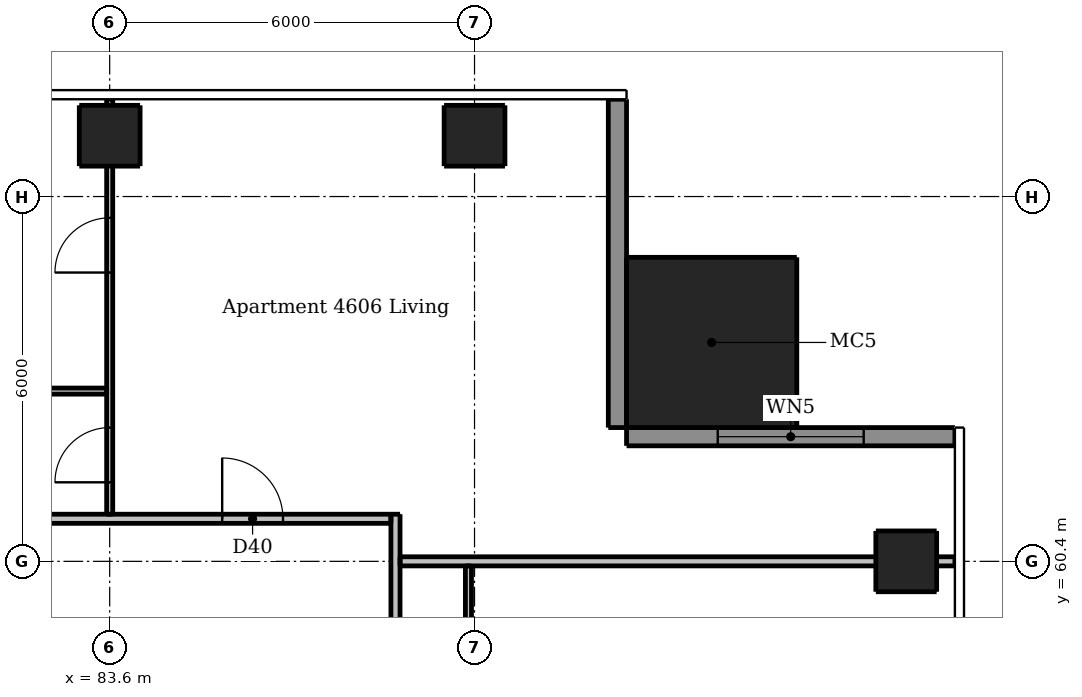
"""IFC4 building model, lengths in metres.
Left out: names, types, materials, properties, quantities, classifications, styles, units other than length and angle.
Written with IfcOpenShell. Run it as: python <this file> out.ifc"""

import sys

from ifc_helpers import new_model, si_unit, direction, frame, frame_2d, origin, origin_2d, place, context, subcontext, project, spatial, rectangle, extrude, element, fill, save


model = new_model("IFC4")
c1 = context("Model", 3, precision=1e-05, world=origin(), true_north=direction((0.0, 1.0)))
c2 = subcontext(c1, "Body", "Model", "MODEL_VIEW")
j1 = project(units=[si_unit("LENGTHUNIT", "METRE"), si_unit("PLANEANGLEUNIT", "RADIAN")], contexts=[c1])
p1 = place(None, origin())
s1 = spatial("IfcSite", under=j1, at=p1, CompositionType="ELEMENT")
p2 = place(p1, origin())
s2 = spatial("IfcBuilding", under=s1, at=p2, CompositionType="ELEMENT")
p3 = place(p2, frame((0.0, 0.0, 171.4)))
s3 = spatial("IfcBuildingStorey", under=s2, at=p3, CompositionType="ELEMENT", Elevation=171.4)
for number, where, z_axis, x_axis in (
    (1, (96.7, 60.4, 0.0), (0.0, 0.0, 1.0), (1.0, 0.0, 0.0)),
    (2, (83.6, 67.4, 0.0), (0.0, 0.0, 1.0), (1.0, 0.0, 0.0)),
    (3, (89.6, 67.4, 0.0), (0.0, 0.0, 1.0), (1.0, 0.0, 0.0)),
):
    element("IfcColumn", number, at=place(p3, frame(where, z_axis=z_axis, x_axis=x_axis)), inside=s3, PredefinedType="COLUMN", context=c2, shape_type="SweptSolid", body=[
        extrude(rectangle(XDim=1.0, YDim=1.0, at=origin_2d()), origin(), (0.0, 0.0, 1.0), 3.05),
    ])
p4 = place(p3, frame((93.5, 64.0, 0.0), z_axis=(0.0, 0.0, 1.0), x_axis=(1.0, 0.0, 0.0)))
e4 = element("IfcColumn", 4, at=p4, inside=s3, PredefinedType="COLUMN", context=c2, shape_type="SweptSolid", body=[
    extrude(rectangle(XDim=2.8, YDim=2.8, at=origin_2d()), origin(), (0.0, 0.0, 1.0), 3.3),
])
p5 = place(p3, frame((97.5, 62.45, 0.0), z_axis=(0.0, 0.0, 1.0), x_axis=(-1.0, 0.0, 0.0)))
e5 = element("IfcWall", 5, at=p5, inside=s3, PredefinedType="SOLIDWALL", context=c2, shape_type="SweptSolid", body=[
    extrude(rectangle(XDim=5.4, YDim=0.3, at=frame_2d((2.7, 0.0))), origin(), (0.0, 0.0, 1.0), 3.05),
])
p6 = place(p5, frame((1.5, 0.0, 0.15)))
e6 = element("IfcOpeningElement", 6, at=p6, cuts=e5, PredefinedType="OPENING", context=c2, shape_type="SweptSolid", body=[
    extrude(rectangle(XDim=2.4, YDim=2.1, at=frame_2d((1.2, 1.05))), frame((0.0, 0.16, 0.0), z_axis=(0.0, -1.0, 0.0), x_axis=(1.0, 0.0, 0.0)), (0.0, 0.0, 1.0), 0.32),
])
p7 = place(p3, frame((91.95, 62.6, 0.0), z_axis=(0.0, 0.0, 1.0), x_axis=(0.0, 1.0, 0.0)))
e7 = element("IfcWall", 7, at=p7, inside=s3, PredefinedType="SOLIDWALL", context=c2, shape_type="SweptSolid", body=[
    extrude(rectangle(XDim=5.4, YDim=0.3, at=frame_2d((2.7, 0.0))), origin(), (0.0, 0.0, 1.0), 3.05),
])
p8 = place(p3, frame((83.6, 61.175, 0.0), z_axis=(0.0, 0.0, 1.0), x_axis=(0.0, 1.0, 0.0)))
e8 = element("IfcWall", 8, at=p8, inside=s3, PredefinedType="PARTITIONING", context=c2, shape_type="SweptSolid", body=[
    extrude(rectangle(XDim=6.825, YDim=0.1, at=frame_2d((3.413, 0.0))), origin(), (0.0, 0.0, 1.0), 2.516),
])
p9 = place(p8, frame((0.525, 0.0, 0.0)))
e9 = element("IfcOpeningElement", 9, at=p9, cuts=e8, PredefinedType="OPENING", context=c2, shape_type="SweptSolid", body=[
    extrude(rectangle(XDim=0.9, YDim=2.1, at=frame_2d((0.45, 1.05))), frame((0.0, 0.06, 0.0), z_axis=(0.0, -1.0, 0.0), x_axis=(1.0, 0.0, 0.0)), (0.0, 0.0, 1.0), 0.12),
])
p10 = place(p8, frame((3.975, 0.0, 0.0)))
e10 = element("IfcOpeningElement", 10, at=p10, cuts=e8, PredefinedType="OPENING", context=c2, shape_type="SweptSolid", body=[
    extrude(rectangle(XDim=0.9, YDim=2.1, at=frame_2d((0.45, 1.05))), frame((0.0, 0.06, 0.0), z_axis=(0.0, -1.0, 0.0), x_axis=(1.0, 0.0, 0.0)), (0.0, 0.0, 1.0), 0.12),
])
p11 = place(p3, frame((89.5, 60.325, 0.0), z_axis=(0.0, 0.0, 1.0), x_axis=(0.0, -1.0, 0.0)))
e11 = element("IfcWall", 11, at=p11, inside=s3, PredefinedType="PARTITIONING", context=c2, shape_type="SweptSolid", body=[
    extrude(rectangle(XDim=20.85, YDim=0.1, at=frame_2d((10.425, 0.0))), origin(), (0.0, 0.0, 1.0), 2.51),
])
p12 = place(p11, frame((9.675, 0.0, 0.0)))
e12 = element("IfcOpeningElement", 12, at=p12, cuts=e11, PredefinedType="OPENING", context=c2, shape_type="SweptSolid", body=[
    extrude(rectangle(XDim=0.9, YDim=2.1, at=frame_2d((0.45, 1.05))), frame((0.0, 0.06, 0.0), z_axis=(0.0, -1.0, 0.0), x_axis=(1.0, 0.0, 0.0)), (0.0, 0.0, 1.0), 0.12),
])
p13 = place(p11, frame((6.675, 0.0, 0.0)))
e13 = element("IfcOpeningElement", 13, at=p13, cuts=e11, PredefinedType="OPENING", context=c2, shape_type="SweptSolid", body=[
    extrude(rectangle(XDim=0.9, YDim=2.1, at=frame_2d((0.45, 1.05))), frame((0.0, 0.06, 0.0), z_axis=(0.0, -1.0, 0.0), x_axis=(1.0, 0.0, 0.0)), (0.0, 0.0, 1.0), 0.12),
])
p14 = place(p11, frame((18.975, 0.0, 0.0)))
e14 = element("IfcOpeningElement", 14, at=p14, cuts=e11, PredefinedType="OPENING", context=c2, shape_type="SweptSolid", body=[
    extrude(rectangle(XDim=0.9, YDim=2.1, at=frame_2d((0.45, 1.05))), frame((0.0, 0.06, 0.0), z_axis=(0.0, -1.0, 0.0), x_axis=(1.0, 0.0, 0.0)), (0.0, 0.0, 1.0), 0.12),
])
p15 = place(p11, frame((15.975, 0.0, 0.0)))
e15 = element("IfcOpeningElement", 15, at=p15, cuts=e11, PredefinedType="OPENING", context=c2, shape_type="SweptSolid", body=[
    extrude(rectangle(XDim=0.9, YDim=2.1, at=frame_2d((0.45, 1.05))), frame((0.0, 0.06, 0.0), z_axis=(0.0, -1.0, 0.0), x_axis=(1.0, 0.0, 0.0)), (0.0, 0.0, 1.0), 0.12),
])
p16 = place(p11, frame((12.975, 0.0, 0.0)))
e16 = element("IfcOpeningElement", 16, at=p16, cuts=e11, PredefinedType="OPENING", context=c2, shape_type="SweptSolid", body=[
    extrude(rectangle(XDim=0.9, YDim=2.1, at=frame_2d((0.45, 1.05))), frame((0.0, 0.06, 0.0), z_axis=(0.0, -1.0, 0.0), x_axis=(1.0, 0.0, 0.0)), (0.0, 0.0, 1.0), 0.12),
])
p17 = place(p11, frame((1.275, 0.0, 0.0)))
e17 = element("IfcOpeningElement", 17, at=p17, cuts=e11, PredefinedType="OPENING", context=c2, shape_type="SweptSolid", body=[
    extrude(rectangle(XDim=0.9, YDim=2.1, at=frame_2d((0.45, 1.05))), frame((0.0, 0.06, 0.0), z_axis=(0.0, -1.0, 0.0), x_axis=(1.0, 0.0, 0.0)), (0.0, 0.0, 1.0), 0.12),
])
p18 = place(p11, frame((4.325, 0.0, 0.0)))
e18 = element("IfcOpeningElement", 18, at=p18, cuts=e11, PredefinedType="OPENING", context=c2, shape_type="SweptSolid", body=[
    extrude(rectangle(XDim=0.8, YDim=2.1, at=frame_2d((0.4, 1.05))), frame((0.0, 0.06, 0.0), z_axis=(0.0, -1.0, 0.0), x_axis=(1.0, 0.0, 0.0)), (0.0, 0.0, 1.0), 0.12),
])
p19 = place(p3, frame((83.55, 63.2, 0.0), z_axis=(0.0, 0.0, 1.0), x_axis=(-1.0, 0.0, 0.0)))
e19 = element("IfcWall", 19, at=p19, inside=s3, PredefinedType="PARTITIONING", context=c2, shape_type="SweptSolid", body=[
    extrude(rectangle(XDim=5.875, YDim=0.1, at=frame_2d((2.938, 0.0))), origin(), (0.0, 0.0, 1.0), 3.05),
])
p20 = place(p19, frame((3.75, 0.0, 0.0)))
e20 = element("IfcOpeningElement", 20, at=p20, cuts=e19, PredefinedType="OPENING", context=c2, shape_type="SweptSolid", body=[
    extrude(rectangle(XDim=0.8, YDim=2.1, at=frame_2d((0.4, 1.05))), frame((0.0, 0.06, 0.0), z_axis=(0.0, -1.0, 0.0), x_axis=(1.0, 0.0, 0.0)), (0.0, 0.0, 1.0), 0.12),
])
p21 = place(p3, frame((88.3, 61.175, 0.0), z_axis=(0.0, 0.0, 1.0), x_axis=(0.0, -1.0, 0.0)))
e21 = element("IfcWall", 21, at=p21, inside=s3, PredefinedType="PARTITIONING", context=c2, shape_type="SweptSolid", body=[
    extrude(rectangle(XDim=29.4, YDim=0.15, at=frame_2d((14.7, 0.0))), origin(), (0.0, 0.0, 1.0), 3.05),
])
p22 = place(p21, frame((28.125, 0.0, 0.0)))
e22 = element("IfcOpeningElement", 22, at=p22, cuts=e21, PredefinedType="OPENING", context=c2, shape_type="SweptSolid", body=[
    extrude(rectangle(XDim=1.0, YDim=2.1, at=frame_2d((0.5, 1.05))), frame((0.0, 0.085, 0.0), z_axis=(0.0, -1.0, 0.0), x_axis=(1.0, 0.0, 0.0)), (0.0, 0.0, 1.0), 0.17),
])
p23 = place(p21, frame((10.775, 0.0, 0.0)))
e23 = element("IfcOpeningElement", 23, at=p23, cuts=e21, PredefinedType="OPENING", context=c2, shape_type="SweptSolid", body=[
    extrude(rectangle(XDim=1.0, YDim=2.1, at=frame_2d((0.5, 1.05))), frame((0.0, 0.085, 0.0), z_axis=(0.0, -1.0, 0.0), x_axis=(1.0, 0.0, 0.0)), (0.0, 0.0, 1.0), 0.17),
])
p24 = place(p3, frame((58.975, 61.1, 0.0), z_axis=(0.0, 0.0, 1.0), x_axis=(1.0, 0.0, 0.0)))
e24 = element("IfcWall", 24, at=p24, inside=s3, PredefinedType="PARTITIONING", context=c2, shape_type="SweptSolid", body=[
    extrude(rectangle(XDim=29.25, YDim=0.15, at=frame_2d((14.625, 0.0))), origin(), (0.0, 0.0, 1.0), 3.05),
])
p25 = place(p24, frame((9.125, 0.0, 0.0)))
e25 = element("IfcOpeningElement", 25, at=p25, cuts=e24, PredefinedType="OPENING", context=c2, shape_type="SweptSolid", body=[
    extrude(rectangle(XDim=1.0, YDim=2.1, at=frame_2d((0.5, 1.05))), frame((0.0, 0.085, 0.0), z_axis=(0.0, -1.0, 0.0), x_axis=(1.0, 0.0, 0.0)), (0.0, 0.0, 1.0), 0.17),
])
p26 = place(p24, frame((26.475, 0.0, 0.0)))
e26 = element("IfcOpeningElement", 26, at=p26, cuts=e24, PredefinedType="OPENING", context=c2, shape_type="SweptSolid", body=[
    extrude(rectangle(XDim=1.0, YDim=2.1, at=frame_2d((0.5, 1.05))), frame((0.0, 0.085, 0.0), z_axis=(0.0, -1.0, 0.0), x_axis=(1.0, 0.0, 0.0)), (0.0, 0.0, 1.0), 0.17),
])
p27 = place(p3, frame((88.375, 60.4, 0.0), z_axis=(0.0, 0.0, 1.0), x_axis=(1.0, 0.0, 0.0)))
e27 = element("IfcWall", 27, at=p27, inside=s3, PredefinedType="PARTITIONING", context=c2, shape_type="SweptSolid", body=[
    extrude(rectangle(XDim=9.125, YDim=0.15, at=frame_2d((4.562, 0.0))), origin(), (0.0, 0.0, 1.0), 2.647),
])
p28 = place(p6, origin())
e28 = element("IfcWindow", 28, at=p28, inside=s3, PartitioningType="DOUBLE_PANEL_VERTICAL", PredefinedType="WINDOW", context=c2, shape_type="SweptSolid", body=[
    extrude(rectangle(XDim=2.4, YDim=2.1, at=frame_2d((1.2, 1.05))), frame((0.0, 0.03, 0.0), z_axis=(0.0, -1.0, 0.0), x_axis=(1.0, 0.0, 0.0)), (0.0, 0.0, 1.0), 0.06),
])
fill(e6, e28)
p29 = place(p26, origin())
e29 = element("IfcDoor", 29, at=p29, inside=s3, OperationType="SINGLE_SWING_LEFT", PredefinedType="DOOR", context=c2, shape_type="SweptSolid", body=[
    extrude(rectangle(XDim=1.0, YDim=2.1, at=frame_2d((0.5, 1.05))), frame((0.0, 0.025, 0.0), z_axis=(0.0, -1.0, 0.0), x_axis=(1.0, 0.0, 0.0)), (0.0, 0.0, 1.0), 0.05),
])
fill(e26, e29)
p30 = place(p9, origin())
e30 = element("IfcDoor", 30, at=p30, inside=s3, OperationType="SINGLE_SWING_LEFT", PredefinedType="DOOR", context=c2, shape_type="SweptSolid", body=[
    extrude(rectangle(XDim=0.9, YDim=2.1, at=frame_2d((0.45, 1.05))), frame((0.0, 0.025, 0.0), z_axis=(0.0, -1.0, 0.0), x_axis=(1.0, 0.0, 0.0)), (0.0, 0.0, 1.0), 0.05),
])
fill(e9, e30)
p31 = place(p10, origin())
e31 = element("IfcDoor", 31, at=p31, inside=s3, OperationType="SINGLE_SWING_LEFT", PredefinedType="DOOR", context=c2, shape_type="SweptSolid", body=[
    extrude(rectangle(XDim=0.9, YDim=2.1, at=frame_2d((0.45, 1.05))), frame((0.0, 0.025, 0.0), z_axis=(0.0, -1.0, 0.0), x_axis=(1.0, 0.0, 0.0)), (0.0, 0.0, 1.0), 0.05),
])
fill(e10, e31)
save(model, sys.argv[1])
